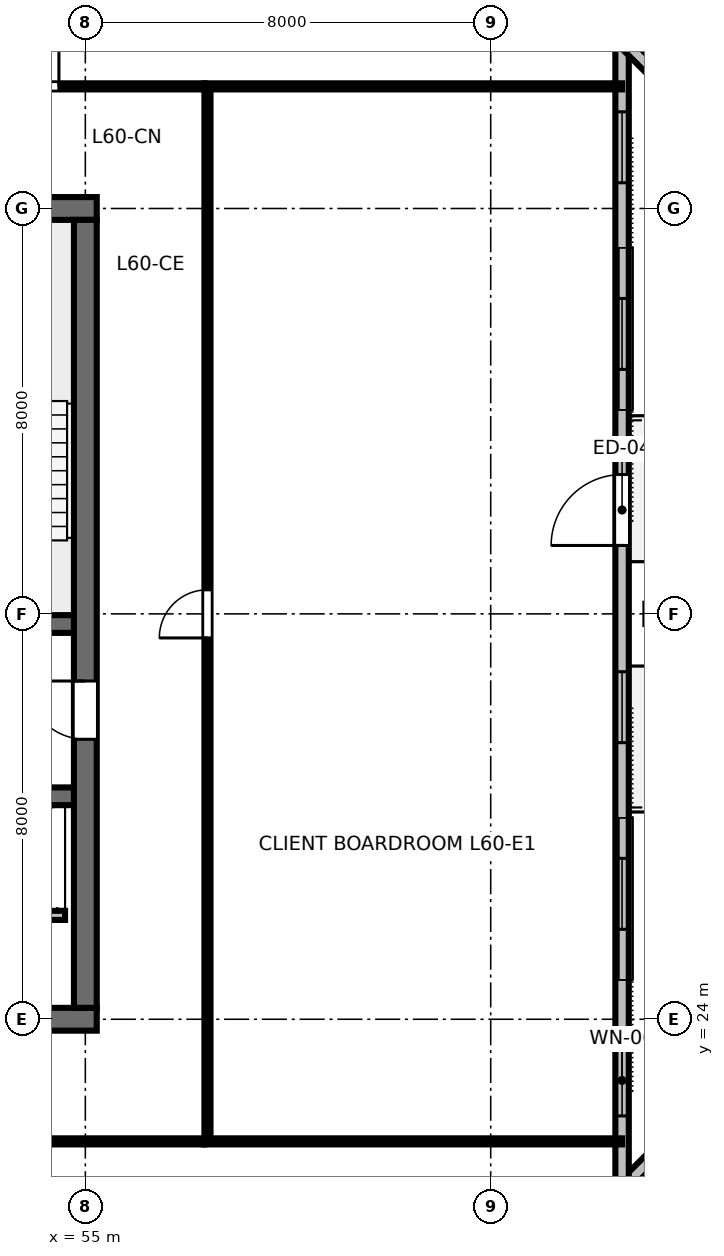
"""IFC4 building model, lengths in metres.
Left out: names, types, materials, properties, quantities, classifications, styles, units other than length and angle.
Written with IfcOpenShell. Run it as: python <this file> out.ifc"""

import sys

from ifc_helpers import new_model, si_unit, direction, frame, frame_2d, origin, origin_2d, place, context, subcontext, project, spatial, rectangle, hollow_rectangle, i_section, extrude, element, fill, save


model = new_model("IFC4")
c1 = context("Model", 3, precision=1e-05, world=origin(), true_north=direction((0.0, 1.0)))
c2 = subcontext(c1, "Body", "Model", "MODEL_VIEW")
j1 = project(units=[si_unit("LENGTHUNIT", "METRE"), si_unit("PLANEANGLEUNIT", "RADIAN")], contexts=[c1])
p1 = place(None, origin())
s1 = spatial("IfcSite", under=j1, at=p1, CompositionType="ELEMENT")
p2 = place(p1, origin())
s2 = spatial("IfcBuilding", under=s1, at=p2, CompositionType="ELEMENT")
p3 = place(p2, frame((0.0, 0.0, 227.4)))
s3 = spatial("IfcBuildingStorey", under=s2, at=p3, CompositionType="ELEMENT", Elevation=227.4)
p4 = place(p3, frame((36.775, 24.0, 0.0), z_axis=(0.0, 0.0, 1.0), x_axis=(1.0, 0.0, 0.0)))
e1 = element("IfcWall", 1, at=p4, inside=s3, PredefinedType="SHEAR", context=c2, shape_type="SweptSolid", body=[
    extrude(rectangle(XDim=18.45, YDim=0.45, at=frame_2d((9.225, 0.0))), origin(), (0.0, 0.0, 1.0), 3.36),
])
p5 = place(p4, frame((13.425, 0.0, 0.0)))
e2 = element("IfcOpeningElement", 2, at=p5, cuts=e1, PredefinedType="OPENING", context=c2, shape_type="SweptSolid", body=[
    extrude(rectangle(XDim=1.6, YDim=2.15, at=frame_2d((0.8, 1.075))), frame((0.0, 0.235, 0.0), z_axis=(0.0, -1.0, 0.0), x_axis=(1.0, 0.0, 0.0)), (0.0, 0.0, 1.0), 0.47),
])
p6 = place(p3, frame((36.775, 40.0, 0.0), z_axis=(0.0, 0.0, 1.0), x_axis=(1.0, 0.0, 0.0)))
e3 = element("IfcWall", 3, at=p6, inside=s3, PredefinedType="SHEAR", context=c2, shape_type="SweptSolid", body=[
    extrude(rectangle(XDim=18.45, YDim=0.45, at=frame_2d((9.225, 0.0))), origin(), (0.0, 0.0, 1.0), 3.36),
])
p7 = place(p6, frame((8.725, 0.0, 0.0)))
e4 = element("IfcOpeningElement", 4, at=p7, cuts=e3, PredefinedType="OPENING", context=c2, shape_type="SweptSolid", body=[
    extrude(rectangle(XDim=1.0, YDim=2.15, at=frame_2d((0.5, 1.075))), frame((0.0, 0.235, 0.0), z_axis=(0.0, -1.0, 0.0), x_axis=(1.0, 0.0, 0.0)), (0.0, 0.0, 1.0), 0.47),
])
p8 = place(p3, frame((55.0, 24.225, 0.0), z_axis=(0.0, 0.0, 1.0), x_axis=(0.0, 1.0, 0.0)))
e5 = element("IfcWall", 5, at=p8, inside=s3, PredefinedType="SHEAR", context=c2, shape_type="SweptSolid", body=[
    extrude(rectangle(XDim=15.55, YDim=0.45, at=frame_2d((7.775, 0.0))), origin(), (0.0, 0.0, 1.0), 3.36),
])
p9 = place(p8, frame((5.3, 0.0, 0.0)))
e6 = element("IfcOpeningElement", 6, at=p9, cuts=e5, PredefinedType="OPENING", context=c2, shape_type="SweptSolid", body=[
    extrude(rectangle(XDim=1.15, YDim=2.15, at=frame_2d((0.575, 1.075))), frame((0.0, 0.235, 0.0), z_axis=(0.0, -1.0, 0.0), x_axis=(1.0, 0.0, 0.0)), (0.0, 0.0, 1.0), 0.47),
])
p10 = place(p3, frame((37.225, 31.8, 0.0), z_axis=(0.0, 0.0, 1.0), x_axis=(1.0, 0.0, 0.0)))
e7 = element("IfcWall", 7, at=p10, inside=s3, PredefinedType="SHEAR", context=c2, shape_type="SweptSolid", body=[
    extrude(rectangle(XDim=17.55, YDim=0.35, at=frame_2d((8.775, 0.0))), origin(), (0.0, 0.0, 1.0), 3.36),
])
p11 = place(p10, frame((0.825, 0.0, 0.0)))
e8 = element("IfcOpeningElement", 8, at=p11, cuts=e7, PredefinedType="OPENING", context=c2, shape_type="SweptSolid", body=[
    extrude(rectangle(XDim=1.1, YDim=2.15, at=frame_2d((0.55, 1.075))), frame((0.0, 0.185, 0.0), z_axis=(0.0, -1.0, 0.0), x_axis=(1.0, 0.0, 0.0)), (0.0, 0.0, 1.0), 0.37),
])
p12 = place(p10, frame((14.725, 0.0, 0.0)))
e9 = element("IfcOpeningElement", 9, at=p12, cuts=e7, PredefinedType="OPENING", context=c2, shape_type="SweptSolid", body=[
    extrude(rectangle(XDim=1.1, YDim=2.15, at=frame_2d((0.55, 1.075))), frame((0.0, 0.185, 0.0), z_axis=(0.0, -1.0, 0.0), x_axis=(1.0, 0.0, 0.0)), (0.0, 0.0, 1.0), 0.37),
])
p13 = place(p3, frame((37.225, 28.4, 0.0), z_axis=(0.0, 0.0, 1.0), x_axis=(1.0, 0.0, 0.0)))
e10 = element("IfcWall", 10, at=p13, inside=s3, PredefinedType="SHEAR", context=c2, shape_type="SweptSolid", body=[
    extrude(rectangle(XDim=17.55, YDim=0.35, at=frame_2d((8.775, 0.0))), origin(), (0.0, 0.0, 1.0), 3.36),
])
p14 = place(p3, frame((66.347, 20.446, 0.0), z_axis=(-0.177516374376, 0.155854312843, 0.971698188738), x_axis=(0.730201092603, -0.64109572948, 0.236225803001)))
e11 = element("IfcColumn", 11, at=p14, inside=s3, PredefinedType="COLUMN", context=c2, shape_type="SweptSolid", body=[
    extrude(hollow_rectangle(XDim=0.58, YDim=0.7, WallThickness=0.032, at=origin_2d()), origin(), (0.0, 0.0, 1.0), 3.471),
])
p15 = place(p3, frame((66.253, 32.0, 0.0), z_axis=(-0.178954370443, 0.0, 0.98385737447), x_axis=(0.98385737447, 0.0, 0.178954370443)))
e12 = element("IfcColumn", 12, at=p15, inside=s3, PredefinedType="COLUMN", context=c2, shape_type="SweptSolid", body=[
    extrude(i_section(OverallWidth=0.401, OverallDepth=0.399, WebThickness=0.025, FlangeThickness=0.04, FilletRadius=0.025, at=origin_2d()), origin(), (0.0, 0.0, 1.0), 3.428),
])
p16 = place(p3, frame((66.347, 43.554, 0.0), z_axis=(-0.177516374376, -0.155854312843, 0.971698188738), x_axis=(0.730201092603, 0.64109572948, 0.236225803001)))
e13 = element("IfcColumn", 13, at=p16, inside=s3, PredefinedType="COLUMN", context=c2, shape_type="SweptSolid", body=[
    extrude(hollow_rectangle(XDim=0.58, YDim=0.7, WallThickness=0.032, at=origin_2d()), origin(), (0.0, 0.0, 1.0), 3.471),
])
p17 = place(p3, frame((58.809, 13.879, 0.0), z_axis=(0.0, 0.0, 1.0), x_axis=(0.707106781187, 0.707106781187, 0.0)))
e14 = element("IfcWall", 14, at=p17, inside=s3, PredefinedType="STANDARD", context=c2, shape_type="SweptSolid", body=[
    extrude(rectangle(XDim=10.405, YDim=0.265, at=frame_2d((5.203, 0.0))), origin(), (0.0, 0.0, 1.0), 2.832),
])
p18 = place(p3, frame((65.593, 19.851, 0.0), z_axis=(0.0, 0.0, 1.0), x_axis=(0.0, 1.0, 0.0)))
e15 = element("IfcWall", 15, at=p18, inside=s3, PredefinedType="STANDARD", context=c2, shape_type="SweptSolid", body=[
    extrude(rectangle(XDim=24.298, YDim=0.265, at=frame_2d((12.149, 0.0))), origin(), (0.0, 0.0, 1.0), 2.832),
])
p19 = place(p18, frame((13.499, 0.0, 0.0)))
e16 = element("IfcOpeningElement", 16, at=p19, cuts=e15, PredefinedType="OPENING", context=c2, shape_type="SweptSolid", body=[
    extrude(rectangle(XDim=1.4, YDim=2.15, at=frame_2d((0.7, 1.075))), frame((0.0, 0.142, 0.0), z_axis=(0.0, -1.0, 0.0), x_axis=(1.0, 0.0, 0.0)), (0.0, 0.0, 1.0), 0.285),
])
p20 = place(p18, frame((2.241, 0.0, 0.85)))
e17 = element("IfcOpeningElement", 17, at=p20, cuts=e15, PredefinedType="OPENING", context=c2, shape_type="SweptSolid", body=[
    extrude(rectangle(XDim=1.4, YDim=1.2, at=frame_2d((0.7, 0.6))), frame((0.0, 0.142, 0.0), z_axis=(0.0, -1.0, 0.0), x_axis=(1.0, 0.0, 0.0)), (0.0, 0.0, 1.0), 0.285),
])
p21 = place(p18, frame((5.925, 0.0, 0.85)))
e18 = element("IfcOpeningElement", 18, at=p21, cuts=e15, PredefinedType="OPENING", context=c2, shape_type="SweptSolid", body=[
    extrude(rectangle(XDim=1.4, YDim=1.2, at=frame_2d((0.7, 0.6))), frame((0.0, 0.142, 0.0), z_axis=(0.0, -1.0, 0.0), x_axis=(1.0, 0.0, 0.0)), (0.0, 0.0, 1.0), 0.285),
])
p22 = place(p18, frame((9.608, 0.0, 0.85)))
e19 = element("IfcOpeningElement", 19, at=p22, cuts=e15, PredefinedType="OPENING", context=c2, shape_type="SweptSolid", body=[
    extrude(rectangle(XDim=1.4, YDim=1.2, at=frame_2d((0.7, 0.6))), frame((0.0, 0.142, 0.0), z_axis=(0.0, -1.0, 0.0), x_axis=(1.0, 0.0, 0.0)), (0.0, 0.0, 1.0), 0.285),
])
p23 = place(p18, frame((16.974, 0.0, 0.85)))
e20 = element("IfcOpeningElement", 20, at=p23, cuts=e15, PredefinedType="OPENING", context=c2, shape_type="SweptSolid", body=[
    extrude(rectangle(XDim=1.4, YDim=1.2, at=frame_2d((0.7, 0.6))), frame((0.0, 0.142, 0.0), z_axis=(0.0, -1.0, 0.0), x_axis=(1.0, 0.0, 0.0)), (0.0, 0.0, 1.0), 0.285),
])
p24 = place(p18, frame((20.657, 0.0, 0.85)))
e21 = element("IfcOpeningElement", 21, at=p24, cuts=e15, PredefinedType="OPENING", context=c2, shape_type="SweptSolid", body=[
    extrude(rectangle(XDim=1.4, YDim=1.2, at=frame_2d((0.7, 0.6))), frame((0.0, 0.142, 0.0), z_axis=(0.0, -1.0, 0.0), x_axis=(1.0, 0.0, 0.0)), (0.0, 0.0, 1.0), 0.285),
])
p25 = place(p3, frame((66.167, 42.764, 0.0), z_axis=(0.0, 0.0, 1.0), x_axis=(-0.707106781187, 0.707106781187, 0.0)))
e22 = element("IfcWall", 22, at=p25, inside=s3, PredefinedType="STANDARD", context=c2, shape_type="SweptSolid", body=[
    extrude(rectangle(XDim=10.405, YDim=0.265, at=frame_2d((5.203, 0.0))), origin(), (0.0, 0.0, 1.0), 2.832),
])
p26 = place(p3, frame((47.6, 26.05, 0.0), z_axis=(0.0, 0.0, 1.0), x_axis=(1.0, 0.0, 0.0)))
e23 = element("IfcWall", 23, at=p26, inside=s3, PredefinedType="PARTITIONING", context=c2, shape_type="SweptSolid", body=[
    extrude(rectangle(XDim=7.0, YDim=0.18, at=frame_2d((3.5, 0.0))), origin(), (0.0, 0.0, 1.0), 3.375),
])
p27 = place(p26, frame((1.2, 0.0, 0.0)))
e24 = element("IfcOpeningElement", 24, at=p27, cuts=e23, PredefinedType="OPENING", context=c2, shape_type="SweptSolid", body=[
    extrude(rectangle(XDim=1.05, YDim=2.15, at=frame_2d((0.525, 1.075))), frame((0.0, 0.1, 0.0), z_axis=(0.0, -1.0, 0.0), x_axis=(1.0, 0.0, 0.0)), (0.0, 0.0, 1.0), 0.2),
])
p28 = place(p26, frame((3.4, 0.0, 0.0)))
e25 = element("IfcOpeningElement", 25, at=p28, cuts=e23, PredefinedType="OPENING", context=c2, shape_type="SweptSolid", body=[
    extrude(rectangle(XDim=1.05, YDim=2.15, at=frame_2d((0.525, 1.075))), frame((0.0, 0.1, 0.0), z_axis=(0.0, -1.0, 0.0), x_axis=(1.0, 0.0, 0.0)), (0.0, 0.0, 1.0), 0.2),
])
p29 = place(p3, frame((47.02, 21.59, 0.0), z_axis=(0.0, 0.0, 1.0), x_axis=(1.0, 0.0, 0.0)))
e26 = element("IfcWall", 26, at=p29, inside=s3, PredefinedType="PARTITIONING", context=c2, shape_type="SweptSolid", body=[
    extrude(rectangle(XDim=10.33, YDim=0.12, at=frame_2d((5.165, 0.0))), origin(), (0.0, 0.0, 1.0), 2.655),
])
p30 = place(p29, frame((1.104, 0.0, 0.0)))
e27 = element("IfcOpeningElement", 27, at=p30, cuts=e26, PredefinedType="OPENING", context=c2, shape_type="SweptSolid", body=[
    extrude(rectangle(XDim=0.95, YDim=2.15, at=frame_2d((0.475, 1.075))), frame((0.0, 0.07, 0.0), z_axis=(0.0, -1.0, 0.0), x_axis=(1.0, 0.0, 0.0)), (0.0, 0.0, 1.0), 0.14),
])
p31 = place(p29, frame((6.199, 0.0, 0.0)))
e28 = element("IfcOpeningElement", 28, at=p31, cuts=e26, PredefinedType="OPENING", context=c2, shape_type="SweptSolid", body=[
    extrude(rectangle(XDim=0.95, YDim=2.15, at=frame_2d((0.475, 1.075))), frame((0.0, 0.07, 0.0), z_axis=(0.0, -1.0, 0.0), x_axis=(1.0, 0.0, 0.0)), (0.0, 0.0, 1.0), 0.14),
])
p32 = place(p3, frame((47.02, 42.41, 0.0), z_axis=(0.0, 0.0, 1.0), x_axis=(1.0, 0.0, 0.0)))
e29 = element("IfcWall", 29, at=p32, inside=s3, PredefinedType="PARTITIONING", context=c2, shape_type="SweptSolid", body=[
    extrude(rectangle(XDim=10.33, YDim=0.12, at=frame_2d((5.165, 0.0))), origin(), (0.0, 0.0, 1.0), 2.655),
])
p33 = place(p32, frame((1.846, 0.0, 0.0)))
e30 = element("IfcOpeningElement", 30, at=p33, cuts=e29, PredefinedType="OPENING", context=c2, shape_type="SweptSolid", body=[
    extrude(rectangle(XDim=0.95, YDim=2.15, at=frame_2d((0.475, 1.075))), frame((0.0, 0.07, 0.0), z_axis=(0.0, -1.0, 0.0), x_axis=(1.0, 0.0, 0.0)), (0.0, 0.0, 1.0), 0.14),
])
p34 = place(p32, frame((6.509, 0.0, 0.0)))
e31 = element("IfcOpeningElement", 31, at=p34, cuts=e29, PredefinedType="OPENING", context=c2, shape_type="SweptSolid", body=[
    extrude(rectangle(XDim=0.95, YDim=2.15, at=frame_2d((0.475, 1.075))), frame((0.0, 0.07, 0.0), z_axis=(0.0, -1.0, 0.0), x_axis=(1.0, 0.0, 0.0)), (0.0, 0.0, 1.0), 0.14),
])
p35 = place(p3, frame((57.41, 21.65, 0.0), z_axis=(0.0, 0.0, 1.0), x_axis=(0.0, 1.0, 0.0)))
e32 = element("IfcWall", 32, at=p35, inside=s3, PredefinedType="PARTITIONING", context=c2, shape_type="SweptSolid", body=[
    extrude(rectangle(XDim=20.7, YDim=0.12, at=frame_2d((10.35, 0.0))), origin(), (0.0, 0.0, 1.0), 2.655),
])
p36 = place(p35, frame((9.875, 0.0, 0.0)))
e33 = element("IfcOpeningElement", 33, at=p36, cuts=e32, PredefinedType="OPENING", context=c2, shape_type="SweptSolid", body=[
    extrude(rectangle(XDim=0.95, YDim=2.15, at=frame_2d((0.475, 1.075))), frame((0.0, 0.07, 0.0), z_axis=(0.0, -1.0, 0.0), x_axis=(1.0, 0.0, 0.0)), (0.0, 0.0, 1.0), 0.14),
])
for number, where, z_axis, x_axis in (
    (34, (57.35, 21.59, 0.0), (0.0, 0.0, 1.0), (1.0, 0.0, 0.0)),
    (35, (57.35, 42.41, 0.0), (0.0, 0.0, 1.0), (1.0, 0.0, 0.0)),
):
    element("IfcWall", number, at=place(p3, frame(where, z_axis=z_axis, x_axis=x_axis)), inside=s3, PredefinedType="PARTITIONING", context=c2, shape_type="SweptSolid", body=[
        extrude(rectangle(XDim=8.243, YDim=0.12, at=frame_2d((4.121, 0.0))), origin(), (0.0, 0.0, 1.0), 2.655),
    ])
p37 = place(p19, origin())
e36 = element("IfcDoor", 36, at=p37, inside=s3, OperationType="SINGLE_SWING_LEFT", PredefinedType="DOOR", context=c2, shape_type="SweptSolid", body=[
    extrude(rectangle(XDim=1.4, YDim=2.15, at=frame_2d((0.7, 1.075))), frame((0.0, 0.025, 0.0), z_axis=(0.0, -1.0, 0.0), x_axis=(1.0, 0.0, 0.0)), (0.0, 0.0, 1.0), 0.05),
])
fill(e16, e36)
p38 = place(p20, origin())
e37 = element("IfcWindow", 37, at=p38, inside=s3, PartitioningType="SINGLE_PANEL", PredefinedType="WINDOW", context=c2, shape_type="SweptSolid", body=[
    extrude(rectangle(XDim=1.4, YDim=1.2, at=frame_2d((0.7, 0.6))), frame((0.0, 0.03, 0.0), z_axis=(0.0, -1.0, 0.0), x_axis=(1.0, 0.0, 0.0)), (0.0, 0.0, 1.0), 0.06),
])
fill(e17, e37)
p39 = place(p21, origin())
e38 = element("IfcWindow", 38, at=p39, inside=s3, PartitioningType="SINGLE_PANEL", PredefinedType="WINDOW", context=c2, shape_type="SweptSolid", body=[
    extrude(rectangle(XDim=1.4, YDim=1.2, at=frame_2d((0.7, 0.6))), frame((0.0, 0.03, 0.0), z_axis=(0.0, -1.0, 0.0), x_axis=(1.0, 0.0, 0.0)), (0.0, 0.0, 1.0), 0.06),
])
fill(e18, e38)
p40 = place(p22, origin())
e39 = element("IfcWindow", 39, at=p40, inside=s3, PartitioningType="SINGLE_PANEL", PredefinedType="WINDOW", context=c2, shape_type="SweptSolid", body=[
    extrude(rectangle(XDim=1.4, YDim=1.2, at=frame_2d((0.7, 0.6))), frame((0.0, 0.03, 0.0), z_axis=(0.0, -1.0, 0.0), x_axis=(1.0, 0.0, 0.0)), (0.0, 0.0, 1.0), 0.06),
])
fill(e19, e39)
p41 = place(p23, origin())
e40 = element("IfcWindow", 40, at=p41, inside=s3, PartitioningType="SINGLE_PANEL", PredefinedType="WINDOW", context=c2, shape_type="SweptSolid", body=[
    extrude(rectangle(XDim=1.4, YDim=1.2, at=frame_2d((0.7, 0.6))), frame((0.0, 0.03, 0.0), z_axis=(0.0, -1.0, 0.0), x_axis=(1.0, 0.0, 0.0)), (0.0, 0.0, 1.0), 0.06),
])
fill(e20, e40)
p42 = place(p24, origin())
e41 = element("IfcWindow", 41, at=p42, inside=s3, PartitioningType="SINGLE_PANEL", PredefinedType="WINDOW", context=c2, shape_type="SweptSolid", body=[
    extrude(rectangle(XDim=1.4, YDim=1.2, at=frame_2d((0.7, 0.6))), frame((0.0, 0.03, 0.0), z_axis=(0.0, -1.0, 0.0), x_axis=(1.0, 0.0, 0.0)), (0.0, 0.0, 1.0), 0.06),
])
fill(e21, e41)
p43 = place(p9, origin())
e42 = element("IfcDoor", 42, at=p43, inside=s3, OperationType="SINGLE_SWING_RIGHT", PredefinedType="DOOR", context=c2, shape_type="SweptSolid", body=[
    extrude(rectangle(XDim=1.15, YDim=2.15, at=frame_2d((0.575, 1.075))), frame((0.0, 0.025, 0.0), z_axis=(0.0, -1.0, 0.0), x_axis=(1.0, 0.0, 0.0)), (0.0, 0.0, 1.0), 0.05),
])
fill(e6, e42)
p44 = place(p34, origin())
e43 = element("IfcDoor", 43, at=p44, inside=s3, OperationType="SINGLE_SWING_RIGHT", PredefinedType="DOOR", context=c2, shape_type="SweptSolid", body=[
    extrude(rectangle(XDim=0.95, YDim=2.15, at=frame_2d((0.475, 1.075))), frame((0.0, 0.025, 0.0), z_axis=(0.0, -1.0, 0.0), x_axis=(1.0, 0.0, 0.0)), (0.0, 0.0, 1.0), 0.05),
])
fill(e31, e43)
p45 = place(p36, origin())
e44 = element("IfcDoor", 44, at=p45, inside=s3, OperationType="SINGLE_SWING_LEFT", PredefinedType="DOOR", context=c2, shape_type="SweptSolid", body=[
    extrude(rectangle(XDim=0.95, YDim=2.15, at=frame_2d((0.475, 1.075))), frame((0.0, 0.025, 0.0), z_axis=(0.0, -1.0, 0.0), x_axis=(1.0, 0.0, 0.0)), (0.0, 0.0, 1.0), 0.05),
])
fill(e33, e44)
save(model, sys.argv[1])
